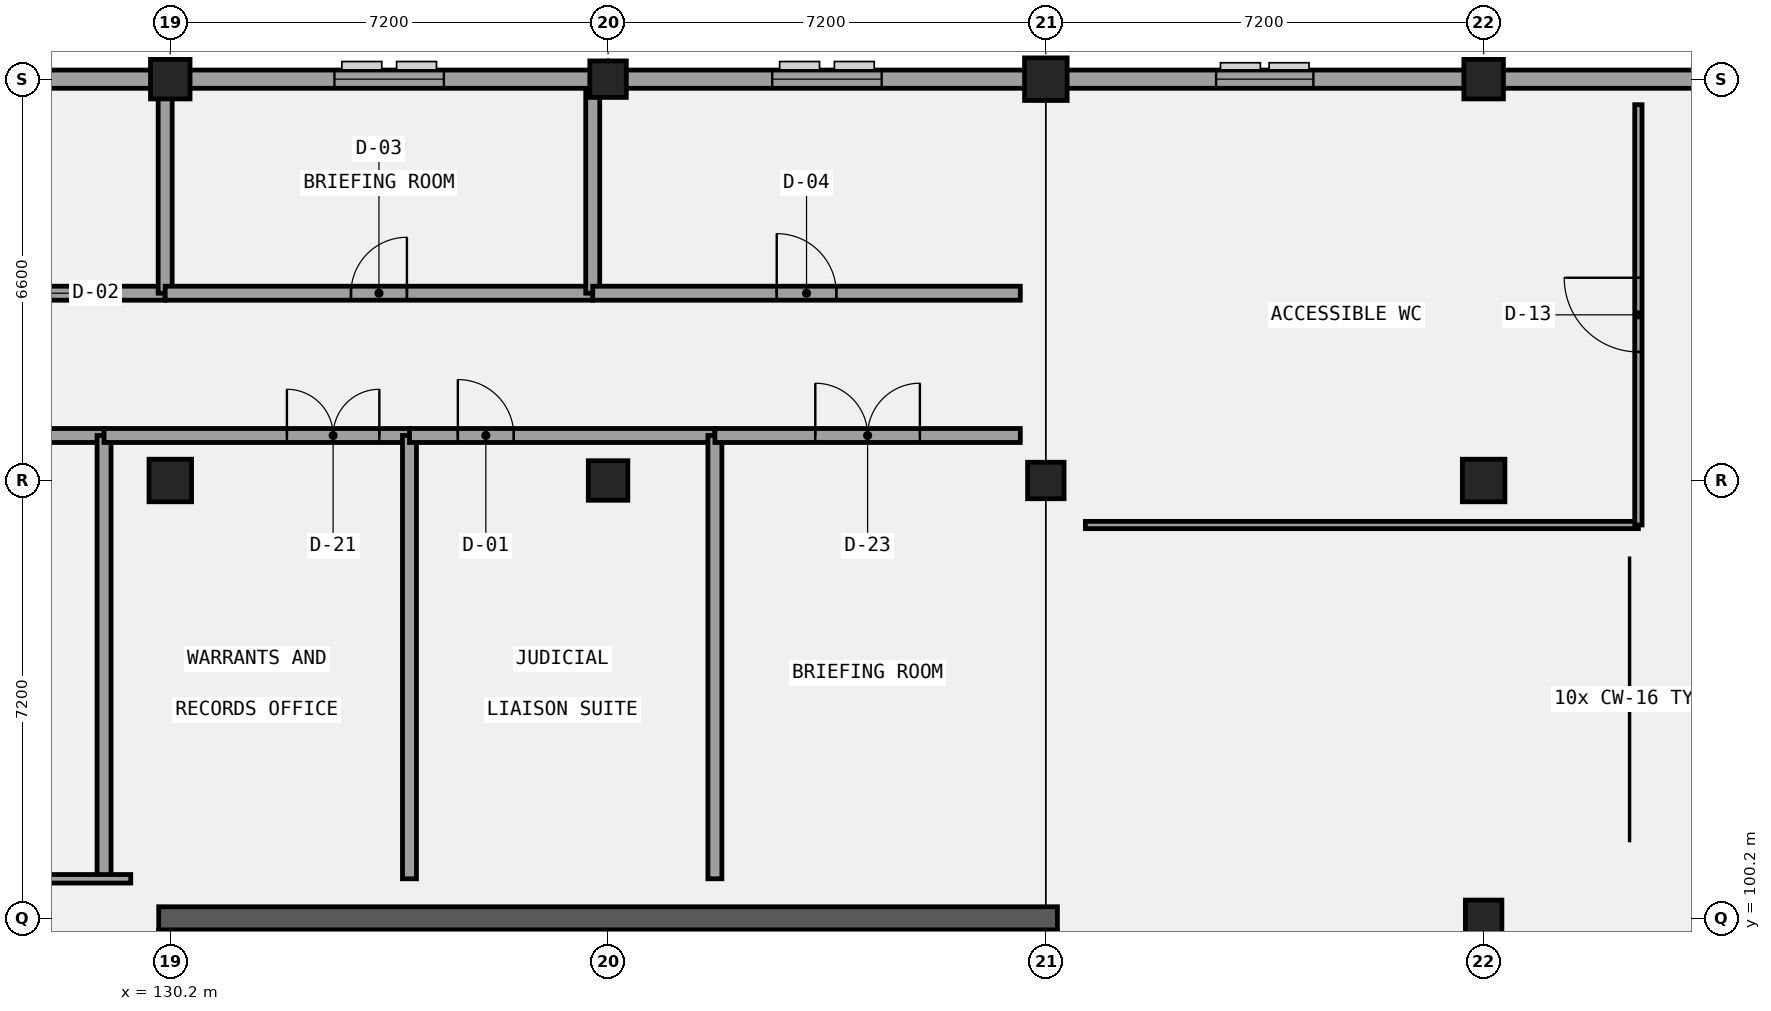
"""IFC4 building model, lengths in metres.
Left out: names, types, materials, properties, quantities, classifications, styles, units other than length and angle.
Written with IfcOpenShell. Run it as: python <this file> out.ifc"""

import sys

from ifc_helpers import new_model, si_unit, direction, frame, frame_2d, origin, origin_2d, place, context, subcontext, project, spatial, rectangle, extrude, element, fill, save


model = new_model("IFC4")
c1 = context("Model", 3, precision=1e-05, world=origin(), true_north=direction((0.0, 1.0)))
c2 = subcontext(c1, "Body", "Model", "MODEL_VIEW")
j1 = project(units=[si_unit("LENGTHUNIT", "METRE"), si_unit("PLANEANGLEUNIT", "RADIAN")], contexts=[c1])
p1 = place(None, origin())
s1 = spatial("IfcSite", under=j1, at=p1, CompositionType="ELEMENT")
p2 = place(p1, origin())
s2 = spatial("IfcBuilding", under=s1, at=p2, CompositionType="ELEMENT")
p3 = place(p2, frame((0.0, 0.0, 13.8)))
s3 = spatial("IfcBuildingStorey", under=s2, at=p3, CompositionType="ELEMENT", Elevation=13.8)
p4 = place(p3, frame((130.01, 100.2, 0.0), z_axis=(0.0, 0.0, 1.0), x_axis=(1.0, 0.0, 0.0)))
e1 = element("IfcWall", 1, at=p4, inside=s3, PredefinedType="SHEAR", context=c2, shape_type="SweptSolid", body=[
    extrude(rectangle(XDim=14.78, YDim=0.38, at=frame_2d((7.39, 0.0))), origin(), (0.0, 0.0, 1.0), 4.2),
])
for number, where, z_axis, x_axis in (
    (2, (130.2, 93.2, 0.0), (0.0, 0.0, 1.0), (0.0, 1.0, 0.0)),
    (3, (144.6, 93.2, 0.0), (0.0, 0.0, 1.0), (0.0, 1.0, 0.0)),
):
    element("IfcWall", number, at=place(p3, frame(where, z_axis=z_axis, x_axis=x_axis)), inside=s3, PredefinedType="SHEAR", context=c2, shape_type="SweptSolid", body=[
        extrude(rectangle(XDim=6.8, YDim=0.38, at=frame_2d((3.4, 0.0))), origin(), (0.0, 0.0, 1.0), 4.2),
    ])
for number, where, z_axis, x_axis in (
    (4, (138.18, 96.82, 0.0), (0.0, 0.0, 1.0), (0.0, 1.0, 0.0)),
    (5, (140.1, 96.82, 0.0), (0.0, 0.0, 1.0), (0.0, 1.0, 0.0)),
    (6, (142.02, 96.82, 0.0), (0.0, 0.0, 1.0), (0.0, 1.0, 0.0)),
    (7, (143.94, 96.82, 0.0), (0.0, 0.0, 1.0), (0.0, 1.0, 0.0)),
):
    element("IfcWall", number, at=place(p3, frame(where, z_axis=z_axis, x_axis=x_axis)), inside=s3, PredefinedType="SHEAR", context=c2, shape_type="SweptSolid", body=[
        extrude(rectangle(XDim=3.18, YDim=0.38, at=frame_2d((1.59, 0.0))), origin(), (0.0, 0.0, 1.0), 4.2),
    ])
p5 = place(p3, frame((130.2, 107.4, 0.0), z_axis=(0.0, 0.0, 1.0), x_axis=(1.0, 0.0, 0.0)))
e8 = element("IfcColumn", 8, at=p5, inside=s3, PredefinedType="COLUMN", context=c2, shape_type="SweptSolid", body=[
    extrude(rectangle(XDim=0.7, YDim=0.7, at=origin_2d()), origin(), (0.0, 0.0, 1.0), 4.2),
])
for number, where, z_axis, x_axis in (
    (9, (130.2, 114.0, 0.0), (0.0, 0.0, 1.0), (1.0, 0.0, 0.0)),
    (10, (137.4, 107.4, 0.0), (0.0, 0.0, 1.0), (1.0, 0.0, 0.0)),
):
    element("IfcColumn", number, at=place(p3, frame(where, z_axis=z_axis, x_axis=x_axis)), inside=s3, PredefinedType="COLUMN", context=c2, shape_type="SweptSolid", body=[
        extrude(rectangle(XDim=0.65, YDim=0.65, at=origin_2d()), origin(), (0.0, 0.0, 1.0), 4.2),
    ])
for number, where, z_axis, x_axis in (
    (11, (137.4, 114.0, 0.0), (0.0, 0.0, 1.0), (1.0, 0.0, 0.0)),
    (12, (144.6, 107.4, 0.0), (0.0, 0.0, 1.0), (1.0, 0.0, 0.0)),
):
    element("IfcColumn", number, at=place(p3, frame(where, z_axis=z_axis, x_axis=x_axis)), inside=s3, PredefinedType="COLUMN", context=c2, shape_type="SweptSolid", body=[
        extrude(rectangle(XDim=0.6, YDim=0.6, at=origin_2d()), origin(), (0.0, 0.0, 1.0), 4.2),
    ])
p6 = place(p3, frame((144.6, 114.0, 0.0), z_axis=(0.0, 0.0, 1.0), x_axis=(1.0, 0.0, 0.0)))
e13 = element("IfcColumn", 13, at=p6, inside=s3, PredefinedType="COLUMN", context=c2, shape_type="SweptSolid", body=[
    extrude(rectangle(XDim=0.7, YDim=0.7, at=origin_2d()), origin(), (0.0, 0.0, 1.0), 4.2),
])
p7 = place(p3, frame((151.8, 100.2, 0.0), z_axis=(0.0, 0.0, 1.0), x_axis=(1.0, 0.0, 0.0)))
e14 = element("IfcColumn", 14, at=p7, inside=s3, PredefinedType="COLUMN", context=c2, shape_type="SweptSolid", body=[
    extrude(rectangle(XDim=0.6, YDim=0.6, at=origin_2d()), origin(), (0.0, 0.0, 1.0), 4.2),
])
p8 = place(p3, frame((151.8, 107.4, 0.0), z_axis=(0.0, 0.0, 1.0), x_axis=(1.0, 0.0, 0.0)))
e15 = element("IfcColumn", 15, at=p8, inside=s3, PredefinedType="COLUMN", context=c2, shape_type="SweptSolid", body=[
    extrude(rectangle(XDim=0.7, YDim=0.7, at=origin_2d()), origin(), (0.0, 0.0, 1.0), 4.2),
])
p9 = place(p3, frame((151.8, 114.0, 0.0), z_axis=(0.0, 0.0, 1.0), x_axis=(1.0, 0.0, 0.0)))
e16 = element("IfcColumn", 16, at=p9, inside=s3, PredefinedType="COLUMN", context=c2, shape_type="SweptSolid", body=[
    extrude(rectangle(XDim=0.65, YDim=0.65, at=origin_2d()), origin(), (0.0, 0.0, 1.0), 4.2),
])
p10 = place(p3, frame((166.35, 114.0, 0.0), z_axis=(0.0, 0.0, 1.0), x_axis=(-1.0, 0.0, 0.0)))
e17 = element("IfcWall", 17, at=p10, inside=s3, PredefinedType="SOLIDWALL", context=c2, shape_type="SweptSolid", body=[
    extrude(rectangle(XDim=21.9, YDim=0.3, at=frame_2d((10.95, 0.0))), origin(), (0.0, 0.0, 1.0), 3.19),
])
p11 = place(p10, frame((17.35, 0.0, 0.95)))
e18 = element("IfcOpeningElement", 18, at=p11, cuts=e17, PredefinedType="OPENING", context=c2, shape_type="SweptSolid", body=[
    extrude(rectangle(XDim=1.6, YDim=1.4, at=frame_2d((0.8, 0.7))), frame((0.0, 0.16, 0.0), z_axis=(0.0, -1.0, 0.0), x_axis=(1.0, 0.0, 0.0)), (0.0, 0.0, 1.0), 0.32),
])
p12 = place(p3, frame((144.75, 114.0, 0.0), z_axis=(0.0, 0.0, 1.0), x_axis=(-1.0, 0.0, 0.0)))
e19 = element("IfcWall", 19, at=p12, inside=s3, PredefinedType="SOLIDWALL", context=c2, shape_type="SweptSolid", body=[
    extrude(rectangle(XDim=36.3, YDim=0.3, at=frame_2d((18.15, 0.0))), origin(), (0.0, 0.0, 1.0), 3.19),
])
p13 = place(p12, frame((31.75, 0.0, 0.95)))
e20 = element("IfcOpeningElement", 20, at=p13, cuts=e19, PredefinedType="OPENING", context=c2, shape_type="SweptSolid", body=[
    extrude(rectangle(XDim=1.6, YDim=1.4, at=frame_2d((0.8, 0.7))), frame((0.0, 0.16, 0.0), z_axis=(0.0, -1.0, 0.0), x_axis=(1.0, 0.0, 0.0)), (0.0, 0.0, 1.0), 0.32),
])
p14 = place(p12, frame((24.55, 0.0, 0.95)))
e21 = element("IfcOpeningElement", 21, at=p14, cuts=e19, PredefinedType="OPENING", context=c2, shape_type="SweptSolid", body=[
    extrude(rectangle(XDim=1.6, YDim=1.65, at=frame_2d((0.8, 0.825))), frame((0.0, 0.16, 0.0), z_axis=(0.0, -1.0, 0.0), x_axis=(1.0, 0.0, 0.0)), (0.0, 0.0, 1.0), 0.32),
])
p15 = place(p12, frame((17.35, 0.0, 0.95)))
e22 = element("IfcOpeningElement", 22, at=p15, cuts=e19, PredefinedType="OPENING", context=c2, shape_type="SweptSolid", body=[
    extrude(rectangle(XDim=1.6, YDim=1.9, at=frame_2d((0.8, 0.95))), frame((0.0, 0.16, 0.0), z_axis=(0.0, -1.0, 0.0), x_axis=(1.0, 0.0, 0.0)), (0.0, 0.0, 1.0), 0.32),
])
p16 = place(p12, frame((10.05, 0.0, 0.95)))
e23 = element("IfcOpeningElement", 23, at=p16, cuts=e19, PredefinedType="OPENING", context=c2, shape_type="SweptSolid", body=[
    extrude(rectangle(XDim=1.8, YDim=1.4, at=frame_2d((0.9, 0.7))), frame((0.0, 0.16, 0.0), z_axis=(0.0, -1.0, 0.0), x_axis=(1.0, 0.0, 0.0)), (0.0, 0.0, 1.0), 0.32),
])
p17 = place(p12, frame((2.85, 0.0, 0.95)))
e24 = element("IfcOpeningElement", 24, at=p17, cuts=e19, PredefinedType="OPENING", context=c2, shape_type="SweptSolid", body=[
    extrude(rectangle(XDim=1.8, YDim=1.65, at=frame_2d((0.9, 0.825))), frame((0.0, 0.16, 0.0), z_axis=(0.0, -1.0, 0.0), x_axis=(1.0, 0.0, 0.0)), (0.0, 0.0, 1.0), 0.32),
])
p18 = place(p3, frame((124.089, 108.14, 0.0), z_axis=(0.0, 0.0, 1.0), x_axis=(1.0, 0.0, 0.0)))
e25 = element("IfcWall", 25, at=p18, inside=s3, PredefinedType="PARTITIONING", context=c2, shape_type="SweptSolid", body=[
    extrude(rectangle(XDim=5.022, YDim=0.23, at=frame_2d((2.511, 0.0))), origin(), (0.0, 0.0, 1.0), 3.94),
])
p19 = place(p18, frame((1.751, 0.0, 0.0)))
e26 = element("IfcOpeningElement", 26, at=p19, cuts=e25, PredefinedType="OPENING", context=c2, shape_type="SweptSolid", body=[
    extrude(rectangle(XDim=1.52, YDim=2.22, at=frame_2d((0.76, 1.11))), frame((0.0, 0.125, 0.0), z_axis=(0.0, -1.0, 0.0), x_axis=(1.0, 0.0, 0.0)), (0.0, 0.0, 1.0), 0.25),
])
p20 = place(p3, frame((129.111, 100.85, 0.0), z_axis=(0.0, 0.0, 1.0), x_axis=(0.0, 1.0, 0.0)))
e27 = element("IfcWall", 27, at=p20, inside=s3, PredefinedType="PARTITIONING", context=c2, shape_type="SweptSolid", body=[
    extrude(rectangle(XDim=7.29, YDim=0.23, at=frame_2d((3.645, 0.0))), origin(), (0.0, 0.0, 1.0), 3.94),
])
p21 = place(p3, frame((129.111, 108.14, 0.0), z_axis=(0.0, 0.0, 1.0), x_axis=(1.0, 0.0, 0.0)))
e28 = element("IfcWall", 28, at=p21, inside=s3, PredefinedType="PARTITIONING", context=c2, shape_type="SweptSolid", body=[
    extrude(rectangle(XDim=5.023, YDim=0.23, at=frame_2d((2.511, 0.0))), origin(), (0.0, 0.0, 1.0), 3.94),
])
p22 = place(p21, frame((3.007, 0.0, 0.0)))
e29 = element("IfcOpeningElement", 29, at=p22, cuts=e28, PredefinedType="OPENING", context=c2, shape_type="SweptSolid", body=[
    extrude(rectangle(XDim=1.52, YDim=2.35, at=frame_2d((0.76, 1.175))), frame((0.0, 0.125, 0.0), z_axis=(0.0, -1.0, 0.0), x_axis=(1.0, 0.0, 0.0)), (0.0, 0.0, 1.0), 0.25),
])
p23 = place(p3, frame((134.134, 100.85, 0.0), z_axis=(0.0, 0.0, 1.0), x_axis=(0.0, 1.0, 0.0)))
e30 = element("IfcWall", 30, at=p23, inside=s3, PredefinedType="PARTITIONING", context=c2, shape_type="SweptSolid", body=[
    extrude(rectangle(XDim=7.29, YDim=0.23, at=frame_2d((3.645, 0.0))), origin(), (0.0, 0.0, 1.0), 3.94),
])
p24 = place(p3, frame((134.134, 108.14, 0.0), z_axis=(0.0, 0.0, 1.0), x_axis=(1.0, 0.0, 0.0)))
e31 = element("IfcWall", 31, at=p24, inside=s3, PredefinedType="PARTITIONING", context=c2, shape_type="SweptSolid", body=[
    extrude(rectangle(XDim=5.023, YDim=0.23, at=frame_2d((2.511, 0.0))), origin(), (0.0, 0.0, 1.0), 3.94),
])
p25 = place(p24, frame((0.796, 0.0, 0.0)))
e32 = element("IfcOpeningElement", 32, at=p25, cuts=e31, PredefinedType="OPENING", context=c2, shape_type="SweptSolid", body=[
    extrude(rectangle(XDim=0.92, YDim=2.1, at=frame_2d((0.46, 1.05))), frame((0.0, 0.125, 0.0), z_axis=(0.0, -1.0, 0.0), x_axis=(1.0, 0.0, 0.0)), (0.0, 0.0, 1.0), 0.25),
])
p26 = place(p3, frame((139.157, 100.85, 0.0), z_axis=(0.0, 0.0, 1.0), x_axis=(0.0, 1.0, 0.0)))
e33 = element("IfcWall", 33, at=p26, inside=s3, PredefinedType="PARTITIONING", context=c2, shape_type="SweptSolid", body=[
    extrude(rectangle(XDim=7.29, YDim=0.23, at=frame_2d((3.645, 0.0))), origin(), (0.0, 0.0, 1.0), 3.94),
])
p27 = place(p3, frame((139.157, 108.14, 0.0), z_axis=(0.0, 0.0, 1.0), x_axis=(1.0, 0.0, 0.0)))
e34 = element("IfcWall", 34, at=p27, inside=s3, PredefinedType="PARTITIONING", context=c2, shape_type="SweptSolid", body=[
    extrude(rectangle(XDim=5.023, YDim=0.23, at=frame_2d((2.511, 0.0))), origin(), (0.0, 0.0, 1.0), 3.94),
])
p28 = place(p27, frame((1.652, 0.0, 0.0)))
e35 = element("IfcOpeningElement", 35, at=p28, cuts=e34, PredefinedType="OPENING", context=c2, shape_type="SweptSolid", body=[
    extrude(rectangle(XDim=1.72, YDim=2.22, at=frame_2d((0.86, 1.11))), frame((0.0, 0.125, 0.0), z_axis=(0.0, -1.0, 0.0), x_axis=(1.0, 0.0, 0.0)), (0.0, 0.0, 1.0), 0.25),
])
p29 = place(p3, frame((123.084, 110.48, 0.0), z_axis=(0.0, 0.0, 1.0), x_axis=(1.0, 0.0, 0.0)))
e36 = element("IfcWall", 36, at=p29, inside=s3, PredefinedType="PARTITIONING", context=c2, shape_type="SweptSolid", body=[
    extrude(rectangle(XDim=7.032, YDim=0.23, at=frame_2d((3.516, 0.0))), origin(), (0.0, 0.0, 1.0), 3.39),
])
p30 = place(p29, frame((3.056, 0.0, 0.0)))
e37 = element("IfcOpeningElement", 37, at=p30, cuts=e36, PredefinedType="OPENING", context=c2, shape_type="SweptSolid", body=[
    extrude(rectangle(XDim=0.92, YDim=2.22, at=frame_2d((0.46, 1.11))), frame((0.0, 0.125, 0.0), z_axis=(0.0, -1.0, 0.0), x_axis=(1.0, 0.0, 0.0)), (0.0, 0.0, 1.0), 0.25),
])
p31 = place(p3, frame((130.116, 110.48, 0.0), z_axis=(0.0, 0.0, 1.0), x_axis=(0.0, 1.0, 0.0)))
e38 = element("IfcWall", 38, at=p31, inside=s3, PredefinedType="PARTITIONING", context=c2, shape_type="SweptSolid", body=[
    extrude(rectangle(XDim=3.34, YDim=0.23, at=frame_2d((1.67, 0.0))), origin(), (0.0, 0.0, 1.0), 3.14),
])
p32 = place(p3, frame((130.116, 110.48, 0.0), z_axis=(0.0, 0.0, 1.0), x_axis=(1.0, 0.0, 0.0)))
e39 = element("IfcWall", 39, at=p32, inside=s3, PredefinedType="PARTITIONING", context=c2, shape_type="SweptSolid", body=[
    extrude(rectangle(XDim=7.032, YDim=0.23, at=frame_2d((3.516, 0.0))), origin(), (0.0, 0.0, 1.0), 3.39),
])
p33 = place(p32, frame((3.056, 0.0, 0.0)))
e40 = element("IfcOpeningElement", 40, at=p33, cuts=e39, PredefinedType="OPENING", context=c2, shape_type="SweptSolid", body=[
    extrude(rectangle(XDim=0.92, YDim=2.35, at=frame_2d((0.46, 1.175))), frame((0.0, 0.125, 0.0), z_axis=(0.0, -1.0, 0.0), x_axis=(1.0, 0.0, 0.0)), (0.0, 0.0, 1.0), 0.25),
])
p34 = place(p3, frame((137.148, 110.48, 0.0), z_axis=(0.0, 0.0, 1.0), x_axis=(0.0, 1.0, 0.0)))
e41 = element("IfcWall", 41, at=p34, inside=s3, PredefinedType="PARTITIONING", context=c2, shape_type="SweptSolid", body=[
    extrude(rectangle(XDim=3.34, YDim=0.23, at=frame_2d((1.67, 0.0))), origin(), (0.0, 0.0, 1.0), 3.09),
])
p35 = place(p3, frame((137.148, 110.48, 0.0), z_axis=(0.0, 0.0, 1.0), x_axis=(1.0, 0.0, 0.0)))
e42 = element("IfcWall", 42, at=p35, inside=s3, PredefinedType="PARTITIONING", context=c2, shape_type="SweptSolid", body=[
    extrude(rectangle(XDim=7.032, YDim=0.23, at=frame_2d((3.516, 0.0))), origin(), (0.0, 0.0, 1.0), 3.39),
])
p36 = place(p35, frame((3.026, 0.0, 0.0)))
e43 = element("IfcOpeningElement", 43, at=p36, cuts=e42, PredefinedType="OPENING", context=c2, shape_type="SweptSolid", body=[
    extrude(rectangle(XDim=0.98, YDim=2.1, at=frame_2d((0.49, 1.05))), frame((0.0, 0.125, 0.0), z_axis=(0.0, -1.0, 0.0), x_axis=(1.0, 0.0, 0.0)), (0.0, 0.0, 1.0), 0.25),
])
p37 = place(p3, frame((126.27, 100.85, 0.0), z_axis=(0.0, 0.0, 1.0), x_axis=(1.0, 0.0, 0.0)))
e44 = element("IfcWall", 44, at=p37, inside=s3, PredefinedType="PARTITIONING", context=c2, shape_type="SweptSolid", body=[
    extrude(rectangle(XDim=3.28, YDim=0.14, at=frame_2d((1.64, 0.0))), origin(), (0.0, 0.0, 1.0), 3.94),
])
p38 = place(p3, frame((145.25, 106.668, 0.0), z_axis=(0.0, 0.0, 1.0), x_axis=(1.0, 0.0, 0.0)))
e45 = element("IfcWall", 45, at=p38, inside=s3, PredefinedType="PARTITIONING", context=c2, shape_type="SweptSolid", body=[
    extrude(rectangle(XDim=9.095, YDim=0.12, at=frame_2d((4.547, 0.0))), origin(), (0.0, 0.0, 1.0), 3.94),
])
p39 = place(p3, frame((154.345, 106.668, 0.0), z_axis=(0.0, 0.0, 1.0), x_axis=(0.0, 1.0, 0.0)))
e46 = element("IfcWall", 46, at=p39, inside=s3, PredefinedType="PARTITIONING", context=c2, shape_type="SweptSolid", body=[
    extrude(rectangle(XDim=6.912, YDim=0.12, at=frame_2d((3.456, 0.0))), origin(), (0.0, 0.0, 1.0), 3.94),
])
p40 = place(p39, frame((2.846, 0.0, 0.0)))
e47 = element("IfcOpeningElement", 47, at=p40, cuts=e46, PredefinedType="OPENING", context=c2, shape_type="SweptSolid", body=[
    extrude(rectangle(XDim=1.22, YDim=2.1, at=frame_2d((0.61, 1.05))), frame((0.0, 0.07, 0.0), z_axis=(0.0, -1.0, 0.0), x_axis=(1.0, 0.0, 0.0)), (0.0, 0.0, 1.0), 0.14),
])
p41 = place(p11, origin())
e48 = element("IfcWindow", 48, at=p41, inside=s3, PartitioningType="SINGLE_PANEL", PredefinedType="WINDOW", context=c2, shape_type="SweptSolid", body=[
    extrude(rectangle(XDim=1.6, YDim=1.4, at=frame_2d((0.8, 0.7))), frame((0.0, 0.03, 0.0), z_axis=(0.0, -1.0, 0.0), x_axis=(1.0, 0.0, 0.0)), (0.0, 0.0, 1.0), 0.06),
])
fill(e18, e48)
p42 = place(p16, origin())
e49 = element("IfcWindow", 49, at=p42, inside=s3, PartitioningType="SINGLE_PANEL", PredefinedType="WINDOW", context=c2, shape_type="SweptSolid", body=[
    extrude(rectangle(XDim=1.8, YDim=1.4, at=frame_2d((0.9, 0.7))), frame((0.0, 0.03, 0.0), z_axis=(0.0, -1.0, 0.0), x_axis=(1.0, 0.0, 0.0)), (0.0, 0.0, 1.0), 0.06),
])
fill(e23, e49)
p43 = place(p17, origin())
e50 = element("IfcWindow", 50, at=p43, inside=s3, PartitioningType="SINGLE_PANEL", PredefinedType="WINDOW", context=c2, shape_type="SweptSolid", body=[
    extrude(rectangle(XDim=1.8, YDim=1.65, at=frame_2d((0.9, 0.825))), frame((0.0, 0.03, 0.0), z_axis=(0.0, -1.0, 0.0), x_axis=(1.0, 0.0, 0.0)), (0.0, 0.0, 1.0), 0.06),
])
fill(e24, e50)
p44 = place(p22, frame((1.52, 0.0, 0.0), z_axis=(0.0, 0.0, 1.0), x_axis=(-1.0, 0.0, 0.0)))
e51 = element("IfcDoor", 51, at=p44, inside=s3, OperationType="DOUBLE_DOOR_SINGLE_SWING", PredefinedType="DOOR", context=c2, shape_type="SweptSolid", body=[
    extrude(rectangle(XDim=1.52, YDim=2.35, at=frame_2d((0.76, 1.175))), frame((0.0, 0.025, 0.0), z_axis=(0.0, -1.0, 0.0), x_axis=(1.0, 0.0, 0.0)), (0.0, 0.0, 1.0), 0.05),
])
fill(e29, e51)
p45 = place(p25, frame((0.92, 0.0, 0.0), z_axis=(0.0, 0.0, 1.0), x_axis=(-1.0, 0.0, 0.0)))
e52 = element("IfcDoor", 52, at=p45, inside=s3, OperationType="SINGLE_SWING_LEFT", PredefinedType="DOOR", context=c2, shape_type="SweptSolid", body=[
    extrude(rectangle(XDim=0.92, YDim=2.1, at=frame_2d((0.46, 1.05))), frame((0.0, 0.025, 0.0), z_axis=(0.0, -1.0, 0.0), x_axis=(1.0, 0.0, 0.0)), (0.0, 0.0, 1.0), 0.05),
])
fill(e32, e52)
p46 = place(p28, frame((1.72, 0.0, 0.0), z_axis=(0.0, 0.0, 1.0), x_axis=(-1.0, 0.0, 0.0)))
e53 = element("IfcDoor", 53, at=p46, inside=s3, OperationType="DOUBLE_DOOR_SINGLE_SWING", PredefinedType="DOOR", context=c2, shape_type="SweptSolid", body=[
    extrude(rectangle(XDim=1.72, YDim=2.22, at=frame_2d((0.86, 1.11))), frame((0.0, 0.025, 0.0), z_axis=(0.0, -1.0, 0.0), x_axis=(1.0, 0.0, 0.0)), (0.0, 0.0, 1.0), 0.05),
])
fill(e35, e53)
p47 = place(p33, origin())
e54 = element("IfcDoor", 54, at=p47, inside=s3, OperationType="SINGLE_SWING_RIGHT", PredefinedType="DOOR", context=c2, shape_type="SweptSolid", body=[
    extrude(rectangle(XDim=0.92, YDim=2.35, at=frame_2d((0.46, 1.175))), frame((0.0, 0.025, 0.0), z_axis=(0.0, -1.0, 0.0), x_axis=(1.0, 0.0, 0.0)), (0.0, 0.0, 1.0), 0.05),
])
fill(e40, e54)
p48 = place(p36, origin())
e55 = element("IfcDoor", 55, at=p48, inside=s3, OperationType="SINGLE_SWING_LEFT", PredefinedType="DOOR", context=c2, shape_type="SweptSolid", body=[
    extrude(rectangle(XDim=0.98, YDim=2.1, at=frame_2d((0.49, 1.05))), frame((0.0, 0.025, 0.0), z_axis=(0.0, -1.0, 0.0), x_axis=(1.0, 0.0, 0.0)), (0.0, 0.0, 1.0), 0.05),
])
fill(e43, e55)
p49 = place(p40, frame((1.22, 0.0, 0.0), z_axis=(0.0, 0.0, 1.0), x_axis=(-1.0, 0.0, 0.0)))
e56 = element("IfcDoor", 56, at=p49, inside=s3, OperationType="SINGLE_SWING_RIGHT", PredefinedType="DOOR", context=c2, shape_type="SweptSolid", body=[
    extrude(rectangle(XDim=1.22, YDim=2.1, at=frame_2d((0.61, 1.05))), frame((0.0, 0.025, 0.0), z_axis=(0.0, -1.0, 0.0), x_axis=(1.0, 0.0, 0.0)), (0.0, 0.0, 1.0), 0.05),
])
fill(e47, e56)
save(model, sys.argv[1])
